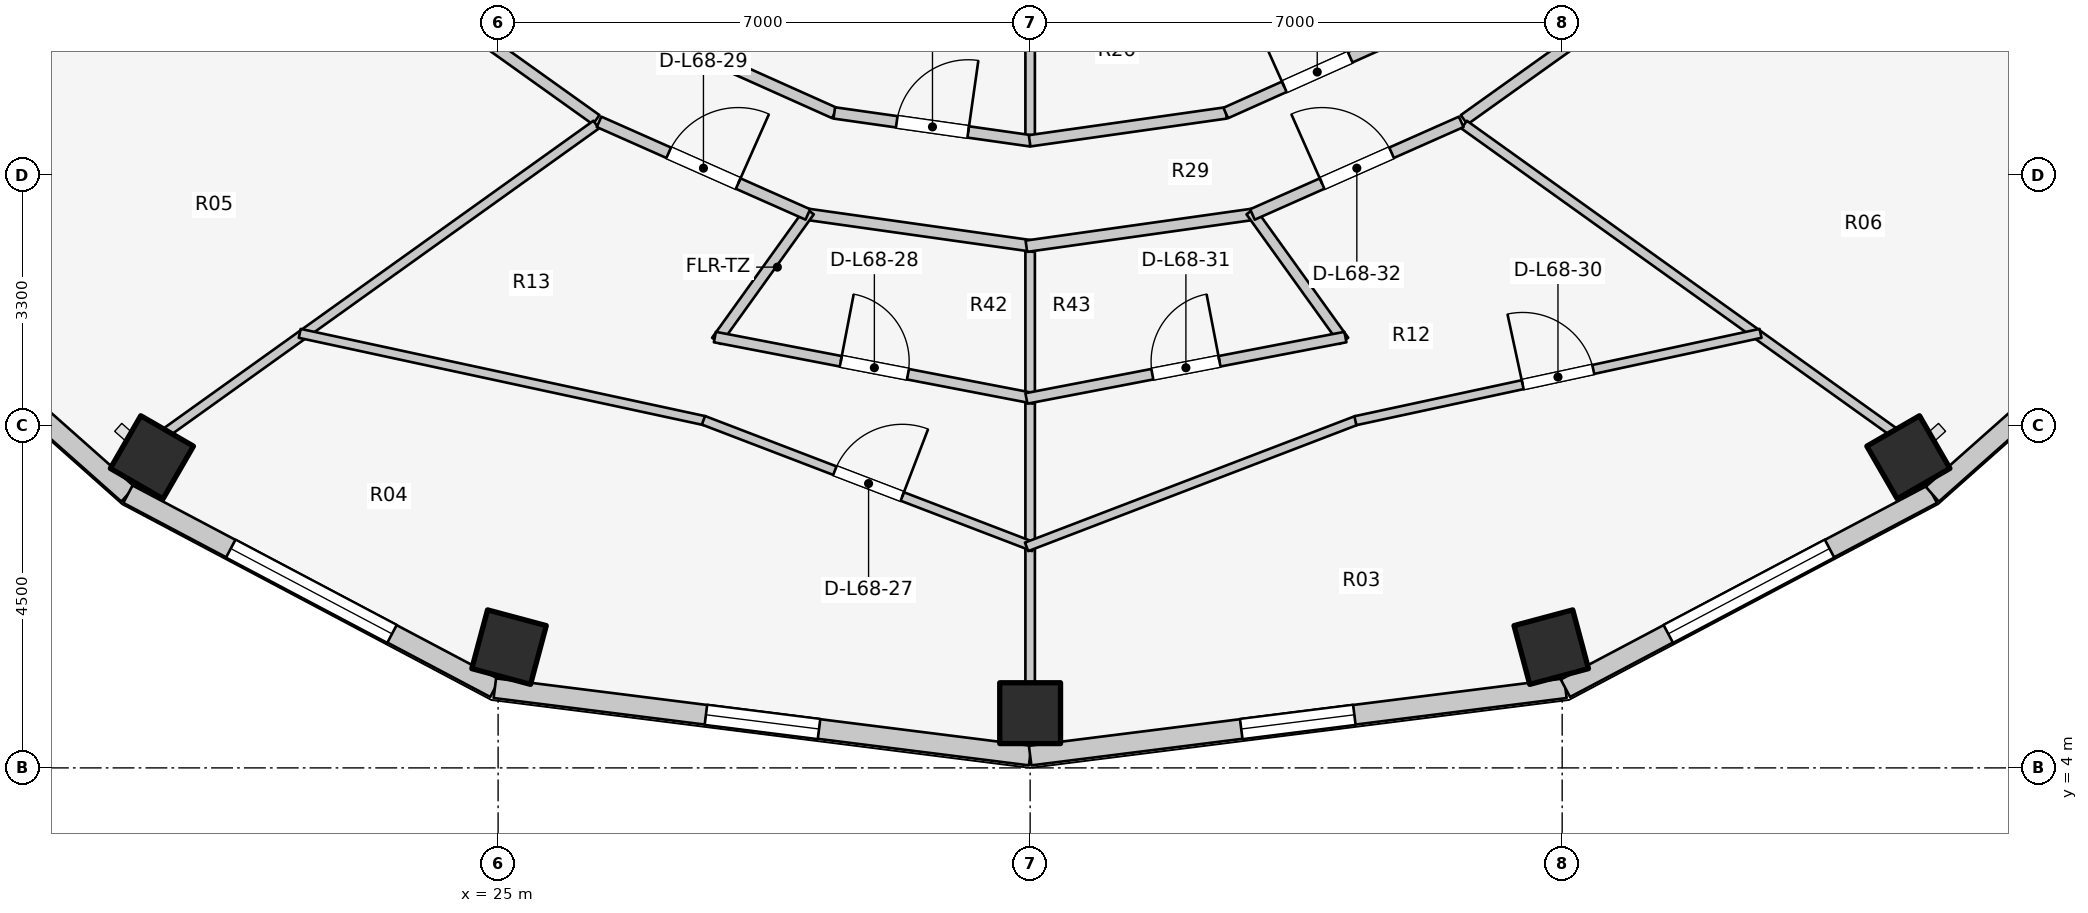
"""IFC4 building model, lengths in metres.
Left out: names, types, materials, properties, quantities, classifications, styles, units other than length and angle.
Written with IfcOpenShell. Run it as: python <this file> out.ifc"""

import sys

from ifc_helpers import new_model, si_unit, direction, frame, frame_2d, origin, origin_2d, place, context, subcontext, project, spatial, rectangle, extrude, element, fill, save


model = new_model("IFC4")
c1 = context("Model", 3, precision=1e-05, world=origin(), true_north=direction((0.0, 1.0)))
c2 = subcontext(c1, "Body", "Model", "MODEL_VIEW")
j1 = project(units=[si_unit("LENGTHUNIT", "METRE"), si_unit("PLANEANGLEUNIT", "RADIAN")], contexts=[c1])
p1 = place(None, origin())
s1 = spatial("IfcSite", under=j1, at=p1, CompositionType="ELEMENT")
p2 = place(p1, origin())
s2 = spatial("IfcBuilding", under=s1, at=p2, CompositionType="ELEMENT")
p3 = place(p2, frame((0.0, 0.0, 223.3)))
s3 = spatial("IfcBuildingStorey", under=s2, at=p3, CompositionType="ELEMENT", Elevation=223.3)
for number, where, z_axis, x_axis in (
    (1, (20.445, 8.086, 0.0), (0.0, 0.0, 1.0), (-0.5, -0.866, 0.0)),
    (2, (25.144, 5.589, 0.0), (0.0, 0.0, 1.0), (-0.259, -0.966, 0.0)),
    (3, (32.0, 4.72, 0.0), (0.0, 0.0, 1.0), (0.0, -1.0, 0.0)),
    (4, (38.856, 5.589, 0.0), (0.0, 0.0, 1.0), (0.259, -0.966, 0.0)),
    (5, (43.555, 8.086, 0.0), (0.0, 0.0, 1.0), (0.5, -0.866, 0.0)),
):
    element("IfcColumn", number, at=place(p3, frame(where, z_axis=z_axis, x_axis=x_axis)), inside=s3, PredefinedType="COLUMN", context=c2, shape_type="SweptSolid", body=[
        extrude(rectangle(XDim=0.8, YDim=0.8, at=origin_2d()), origin(), (0.0, 0.0, 1.0), 3.1),
    ])
p4 = place(p3, frame((16.442, 10.871, 0.0), z_axis=(0.0, 0.0, 1.0), x_axis=(0.748165854006, -0.663511759428, 0.0)))
e6 = element("IfcWall", 6, at=p4, inside=s3, PredefinedType="STANDARD", context=c2, shape_type="SweptSolid", body=[
    extrude(rectangle(XDim=4.929, YDim=0.26, at=frame_2d((2.464, 0.0))), origin(), (0.0, 0.0, 1.0), 2.85),
])
p5 = place(p3, frame((20.13, 7.601, 0.0), z_axis=(0.0, 0.0, 1.0), x_axis=(0.884000981341, -0.46748504253, 0.0)))
e7 = element("IfcWall", 7, at=p5, inside=s3, PredefinedType="STANDARD", context=c2, shape_type="SweptSolid", body=[
    extrude(rectangle(XDim=5.46, YDim=0.26, at=frame_2d((2.73, 0.0))), origin(), (0.0, 0.0, 1.0), 2.85),
])
p6 = place(p5, frame((1.53, 0.0, 0.75)))
e8 = element("IfcOpeningElement", 8, at=p6, cuts=e7, PredefinedType="OPENING", context=c2, shape_type="SweptSolid", body=[
    extrude(rectangle(XDim=2.4, YDim=1.7, at=frame_2d((1.2, 0.85))), frame((0.0, 0.14, 0.0), z_axis=(0.0, -1.0, 0.0), x_axis=(1.0, 0.0, 0.0)), (0.0, 0.0, 1.0), 0.28),
])
p7 = place(p3, frame((24.957, 5.048, 0.0), z_axis=(0.0, 0.0, 1.0), x_axis=(0.992180211307, -0.124813574142, 0.0)))
e9 = element("IfcWall", 9, at=p7, inside=s3, PredefinedType="STANDARD", context=c2, shape_type="SweptSolid", body=[
    extrude(rectangle(XDim=7.098, YDim=0.26, at=frame_2d((3.549, 0.0))), origin(), (0.0, 0.0, 1.0), 2.85),
])
p8 = place(p7, frame((2.799, 0.0, 0.75)))
e10 = element("IfcOpeningElement", 10, at=p8, cuts=e9, PredefinedType="OPENING", context=c2, shape_type="SweptSolid", body=[
    extrude(rectangle(XDim=1.5, YDim=1.6, at=frame_2d((0.75, 0.8))), frame((0.0, 0.14, 0.0), z_axis=(0.0, -1.0, 0.0), x_axis=(1.0, 0.0, 0.0)), (0.0, 0.0, 1.0), 0.28),
])
p9 = place(p3, frame((32.0, 4.162, 0.0), z_axis=(0.0, 0.0, 1.0), x_axis=(0.992180211307, 0.124813574142, 0.0)))
e11 = element("IfcWall", 11, at=p9, inside=s3, PredefinedType="STANDARD", context=c2, shape_type="SweptSolid", body=[
    extrude(rectangle(XDim=7.098, YDim=0.26, at=frame_2d((3.549, 0.0))), origin(), (0.0, 0.0, 1.0), 2.85),
])
p10 = place(p9, frame((2.799, 0.0, 0.75)))
e12 = element("IfcOpeningElement", 12, at=p10, cuts=e11, PredefinedType="OPENING", context=c2, shape_type="SweptSolid", body=[
    extrude(rectangle(XDim=1.5, YDim=1.6, at=frame_2d((0.75, 0.8))), frame((0.0, 0.14, 0.0), z_axis=(0.0, -1.0, 0.0), x_axis=(1.0, 0.0, 0.0)), (0.0, 0.0, 1.0), 0.28),
])
p11 = place(p3, frame((39.043, 5.048, 0.0), z_axis=(0.0, 0.0, 1.0), x_axis=(0.884000981341, 0.46748504253, 0.0)))
e13 = element("IfcWall", 13, at=p11, inside=s3, PredefinedType="STANDARD", context=c2, shape_type="SweptSolid", body=[
    extrude(rectangle(XDim=5.46, YDim=0.26, at=frame_2d((2.73, 0.0))), origin(), (0.0, 0.0, 1.0), 2.85),
])
p12 = place(p11, frame((1.53, 0.0, 0.75)))
e14 = element("IfcOpeningElement", 14, at=p12, cuts=e13, PredefinedType="OPENING", context=c2, shape_type="SweptSolid", body=[
    extrude(rectangle(XDim=2.4, YDim=1.7, at=frame_2d((1.2, 0.85))), frame((0.0, 0.14, 0.0), z_axis=(0.0, -1.0, 0.0), x_axis=(1.0, 0.0, 0.0)), (0.0, 0.0, 1.0), 0.28),
])
p13 = place(p3, frame((43.87, 7.601, 0.0), z_axis=(0.0, 0.0, 1.0), x_axis=(0.748165854006, 0.663511759428, 0.0)))
e15 = element("IfcWall", 15, at=p13, inside=s3, PredefinedType="STANDARD", context=c2, shape_type="SweptSolid", body=[
    extrude(rectangle(XDim=4.929, YDim=0.26, at=frame_2d((2.464, 0.0))), origin(), (0.0, 0.0, 1.0), 2.85),
])
p14 = place(p3, frame((32.0, 14.9, 0.0), z_axis=(0.0, 0.0, 1.0), x_axis=(0.0, -1.0, 0.0)))
e16 = element("IfcWall", 16, at=p14, inside=s3, PredefinedType="PARTITIONING", context=c2, shape_type="SweptSolid", body=[
    extrude(rectangle(XDim=2.65, YDim=0.125, at=frame_2d((1.325, 0.0))), origin(), (0.0, 0.0, 1.0), 2.376),
])
p15 = place(p3, frame((27.019, 13.694, 0.0), z_axis=(0.0, 0.0, 1.0), x_axis=(0.912628408652, -0.408790151203, 0.0)))
e17 = element("IfcWall", 17, at=p15, inside=s3, PredefinedType="PARTITIONING", context=c2, shape_type="SweptSolid", body=[
    extrude(rectangle(XDim=2.638, YDim=0.15, at=frame_2d((1.319, 0.0))), origin(), (0.0, 0.0, 1.0), 2.376),
])
p16 = place(p3, frame((29.423, 12.617, 0.0), z_axis=(0.0, 0.0, 1.0), x_axis=(0.990078185178, -0.140517569133, 0.0)))
e18 = element("IfcWall", 18, at=p16, inside=s3, PredefinedType="PARTITIONING", context=c2, shape_type="SweptSolid", body=[
    extrude(rectangle(XDim=2.61, YDim=0.15, at=frame_2d((1.305, 0.0))), origin(), (0.0, 0.0, 1.0), 2.376),
])
p17 = place(p16, frame((0.83, 0.0, 0.0)))
e19 = element("IfcOpeningElement", 19, at=p17, cuts=e18, PredefinedType="OPENING", context=c2, shape_type="SweptSolid", body=[
    extrude(rectangle(XDim=0.95, YDim=2.1, at=frame_2d((0.475, 1.05))), frame((0.0, 0.085, 0.0), z_axis=(0.0, -1.0, 0.0), x_axis=(1.0, 0.0, 0.0)), (0.0, 0.0, 1.0), 0.17),
])
p18 = place(p3, frame((31.993, 12.25, 0.0), z_axis=(0.0, 0.0, 1.0), x_axis=(0.990078185178, 0.140517569133, 0.0)))
e20 = element("IfcWall", 20, at=p18, inside=s3, PredefinedType="PARTITIONING", context=c2, shape_type="SweptSolid", body=[
    extrude(rectangle(XDim=2.61, YDim=0.15, at=frame_2d((1.305, 0.0))), origin(), (0.0, 0.0, 1.0), 2.376),
])
p19 = place(p3, frame((34.573, 12.616, 0.0), z_axis=(0.0, 0.0, 1.0), x_axis=(0.912628408652, 0.408790151203, 0.0)))
e21 = element("IfcWall", 21, at=p19, inside=s3, PredefinedType="PARTITIONING", context=c2, shape_type="SweptSolid", body=[
    extrude(rectangle(XDim=2.638, YDim=0.15, at=frame_2d((1.319, 0.0))), origin(), (0.0, 0.0, 1.0), 2.376),
])
p20 = place(p19, frame((0.844, 0.0, 0.0)))
e22 = element("IfcOpeningElement", 22, at=p20, cuts=e21, PredefinedType="OPENING", context=c2, shape_type="SweptSolid", body=[
    extrude(rectangle(XDim=0.95, YDim=2.1, at=frame_2d((0.475, 1.05))), frame((0.0, 0.085, 0.0), z_axis=(0.0, -1.0, 0.0), x_axis=(1.0, 0.0, 0.0)), (0.0, 0.0, 1.0), 0.17),
])
for number, where, z_axis, x_axis in (
    (23, (26.29, 12.527, 0.0), (0.0, 0.0, 1.0), (-0.814, 0.581, 0.0)),
    (24, (37.71, 12.527, 0.0), (0.0, 0.0, 1.0), (0.814, 0.581, 0.0)),
):
    element("IfcWall", number, at=place(p3, frame(where, z_axis=z_axis, x_axis=x_axis)), inside=s3, PredefinedType="PARTITIONING", context=c2, shape_type="SweptSolid", body=[
        extrude(rectangle(XDim=2.082, YDim=0.15, at=frame_2d((1.041, 0.0))), origin(), (0.0, 0.0, 1.0), 2.376),
    ])
p21 = place(p3, frame((26.29, 12.463, 0.0), z_axis=(0.0, 0.0, 1.0), x_axis=(-0.813163816543, -0.582034885093, 0.0)))
e25 = element("IfcWall", 25, at=p21, inside=s3, PredefinedType="PARTITIONING", context=c2, shape_type="SweptSolid", body=[
    extrude(rectangle(XDim=6.955, YDim=0.125, at=frame_2d((3.477, 0.0))), origin(), (0.0, 0.0, 1.0), 2.376),
])
p22 = place(p3, frame((32.0, 10.815, 0.0), z_axis=(0.0, 0.0, 1.0), x_axis=(0.0, -1.0, 0.0)))
e26 = element("IfcWall", 26, at=p22, inside=s3, PredefinedType="PARTITIONING", context=c2, shape_type="SweptSolid", body=[
    extrude(rectangle(XDim=5.715, YDim=0.125, at=frame_2d((2.857, 0.0))), origin(), (0.0, 0.0, 1.0), 2.376),
])
p23 = place(p3, frame((37.71, 12.463, 0.0), z_axis=(0.0, 0.0, 1.0), x_axis=(0.813163816543, -0.582034885093, 0.0)))
e27 = element("IfcWall", 27, at=p23, inside=s3, PredefinedType="PARTITIONING", context=c2, shape_type="SweptSolid", body=[
    extrude(rectangle(XDim=6.955, YDim=0.125, at=frame_2d((3.477, 0.0))), origin(), (0.0, 0.0, 1.0), 2.376),
])
p24 = place(p3, frame((22.39, 9.717, 0.0), z_axis=(0.0, 0.0, 1.0), x_axis=(0.977534972695, -0.210773283785, 0.0)))
e28 = element("IfcWall", 28, at=p24, inside=s3, PredefinedType="MOVABLE", context=c2, shape_type="SweptSolid", body=[
    extrude(rectangle(XDim=5.453, YDim=0.12, at=frame_2d((2.727, 0.0))), origin(), (0.0, 0.0, 1.0), 2.376),
])
p25 = place(p3, frame((27.702, 8.573, 0.0), z_axis=(0.0, 0.0, 1.0), x_axis=(0.933766866443, -0.357881878744, 0.0)))
e29 = element("IfcWall", 29, at=p25, inside=s3, PredefinedType="MOVABLE", context=c2, shape_type="SweptSolid", body=[
    extrude(rectangle(XDim=4.653, YDim=0.12, at=frame_2d((2.327, 0.0))), origin(), (0.0, 0.0, 1.0), 2.376),
])
p26 = place(p25, frame((1.852, 0.0, 0.0)))
e30 = element("IfcOpeningElement", 30, at=p26, cuts=e29, PredefinedType="OPENING", context=c2, shape_type="SweptSolid", body=[
    extrude(rectangle(XDim=0.95, YDim=2.1, at=frame_2d((0.475, 1.05))), frame((0.0, 0.07, 0.0), z_axis=(0.0, -1.0, 0.0), x_axis=(1.0, 0.0, 0.0)), (0.0, 0.0, 1.0), 0.14),
])
p27 = place(p3, frame((29.018, 11.29, 0.0), z_axis=(0.0, 0.0, 1.0), x_axis=(0.990214091671, -0.13955662885, 0.0)))
e31 = element("IfcWall", 31, at=p27, inside=s3, PredefinedType="PARTITIONING", context=c2, shape_type="SweptSolid", body=[
    extrude(rectangle(XDim=3.062, YDim=0.15, at=frame_2d((1.531, 0.0))), origin(), (0.0, 0.0, 1.0), 2.376),
])
p28 = place(p3, frame((29.097, 11.324, 0.0), z_axis=(0.0, 0.0, 1.0), x_axis=(-0.583259891741, -0.812285601673, 0.0)))
e32 = element("IfcWall", 32, at=p28, inside=s3, PredefinedType="PLUMBINGWALL", context=c2, shape_type="SweptSolid", body=[
    extrude(rectangle(XDim=2.1, YDim=0.14, at=frame_2d((1.05, 0.0))), origin(), (0.0, 0.0, 1.0), 2.385),
])
p29 = place(p3, frame((27.852, 9.668, 0.0), z_axis=(0.0, 0.0, 1.0), x_axis=(0.98198484664, -0.188959680803, 0.0)))
e33 = element("IfcWall", 33, at=p29, inside=s3, PredefinedType="PLUMBINGWALL", context=c2, shape_type="SweptSolid", body=[
    extrude(rectangle(XDim=4.274, YDim=0.14, at=frame_2d((2.137, 0.0))), origin(), (0.0, 0.0, 1.0), 2.376),
])
p30 = place(p29, frame((1.687, 0.0, 0.0)))
e34 = element("IfcOpeningElement", 34, at=p30, cuts=e33, PredefinedType="OPENING", context=c2, shape_type="SweptSolid", body=[
    extrude(rectangle(XDim=0.9, YDim=2.1, at=frame_2d((0.45, 1.05))), frame((0.0, 0.08, 0.0), z_axis=(0.0, -1.0, 0.0), x_axis=(1.0, 0.0, 0.0)), (0.0, 0.0, 1.0), 0.16),
])
p31 = place(p3, frame((26.328, 12.499, 0.0), z_axis=(0.0, 0.0, 1.0), x_axis=(0.914139569865, -0.405399613724, 0.0)))
e35 = element("IfcWall", 35, at=p31, inside=s3, PredefinedType="PARTITIONING", context=c2, shape_type="SweptSolid", body=[
    extrude(rectangle(XDim=3.005, YDim=0.15, at=frame_2d((1.502, 0.0))), origin(), (0.0, 0.0, 1.0), 2.376),
])
p32 = place(p31, frame((1.002, 0.0, 0.0)))
e36 = element("IfcOpeningElement", 36, at=p32, cuts=e35, PredefinedType="OPENING", context=c2, shape_type="SweptSolid", body=[
    extrude(rectangle(XDim=1.0, YDim=2.1, at=frame_2d((0.5, 1.05))), frame((0.0, 0.085, 0.0), z_axis=(0.0, -1.0, 0.0), x_axis=(1.0, 0.0, 0.0)), (0.0, 0.0, 1.0), 0.17),
])
p33 = place(p3, frame((31.953, 6.908, 0.0), z_axis=(0.0, 0.0, 1.0), x_axis=(0.933766866443, 0.357881878744, 0.0)))
e37 = element("IfcWall", 37, at=p33, inside=s3, PredefinedType="MOVABLE", context=c2, shape_type="SweptSolid", body=[
    extrude(rectangle(XDim=4.653, YDim=0.12, at=frame_2d((2.327, 0.0))), origin(), (0.0, 0.0, 1.0), 2.376),
])
p34 = place(p3, frame((36.279, 8.567, 0.0), z_axis=(0.0, 0.0, 1.0), x_axis=(0.977534972695, 0.210773283785, 0.0)))
e38 = element("IfcWall", 38, at=p34, inside=s3, PredefinedType="MOVABLE", context=c2, shape_type="SweptSolid", body=[
    extrude(rectangle(XDim=5.453, YDim=0.12, at=frame_2d((2.727, 0.0))), origin(), (0.0, 0.0, 1.0), 2.376),
])
p35 = place(p34, frame((2.252, 0.0, 0.0)))
e39 = element("IfcOpeningElement", 39, at=p35, cuts=e38, PredefinedType="OPENING", context=c2, shape_type="SweptSolid", body=[
    extrude(rectangle(XDim=0.95, YDim=2.1, at=frame_2d((0.475, 1.05))), frame((0.0, 0.07, 0.0), z_axis=(0.0, -1.0, 0.0), x_axis=(1.0, 0.0, 0.0)), (0.0, 0.0, 1.0), 0.14),
])
p36 = place(p3, frame((31.95, 10.863, 0.0), z_axis=(0.0, 0.0, 1.0), x_axis=(0.990214091671, 0.13955662885, 0.0)))
e40 = element("IfcWall", 40, at=p36, inside=s3, PredefinedType="PARTITIONING", context=c2, shape_type="SweptSolid", body=[
    extrude(rectangle(XDim=3.062, YDim=0.15, at=frame_2d((1.531, 0.0))), origin(), (0.0, 0.0, 1.0), 2.376),
])
p37 = place(p3, frame((34.903, 11.324, 0.0), z_axis=(0.0, 0.0, 1.0), x_axis=(0.583259891741, -0.812285601673, 0.0)))
e41 = element("IfcWall", 41, at=p37, inside=s3, PredefinedType="PLUMBINGWALL", context=c2, shape_type="SweptSolid", body=[
    extrude(rectangle(XDim=2.1, YDim=0.14, at=frame_2d((1.05, 0.0))), origin(), (0.0, 0.0, 1.0), 2.385),
])
p38 = place(p3, frame((31.951, 8.861, 0.0), z_axis=(0.0, 0.0, 1.0), x_axis=(0.98198484664, 0.188959680803, 0.0)))
e42 = element("IfcWall", 42, at=p38, inside=s3, PredefinedType="PLUMBINGWALL", context=c2, shape_type="SweptSolid", body=[
    extrude(rectangle(XDim=4.274, YDim=0.14, at=frame_2d((2.137, 0.0))), origin(), (0.0, 0.0, 1.0), 2.376),
])
p39 = place(p38, frame((1.687, 0.0, 0.0)))
e43 = element("IfcOpeningElement", 43, at=p39, cuts=e42, PredefinedType="OPENING", context=c2, shape_type="SweptSolid", body=[
    extrude(rectangle(XDim=0.9, YDim=2.1, at=frame_2d((0.45, 1.05))), frame((0.0, 0.08, 0.0), z_axis=(0.0, -1.0, 0.0), x_axis=(1.0, 0.0, 0.0)), (0.0, 0.0, 1.0), 0.16),
])
p40 = place(p3, frame((34.925, 11.281, 0.0), z_axis=(0.0, 0.0, 1.0), x_axis=(0.914139569865, 0.405399613724, 0.0)))
e44 = element("IfcWall", 44, at=p40, inside=s3, PredefinedType="PARTITIONING", context=c2, shape_type="SweptSolid", body=[
    extrude(rectangle(XDim=3.005, YDim=0.15, at=frame_2d((1.502, 0.0))), origin(), (0.0, 0.0, 1.0), 2.376),
])
p41 = place(p40, frame((1.002, 0.0, 0.0)))
e45 = element("IfcOpeningElement", 45, at=p41, cuts=e44, PredefinedType="OPENING", context=c2, shape_type="SweptSolid", body=[
    extrude(rectangle(XDim=1.0, YDim=2.1, at=frame_2d((0.5, 1.05))), frame((0.0, 0.085, 0.0), z_axis=(0.0, -1.0, 0.0), x_axis=(1.0, 0.0, 0.0)), (0.0, 0.0, 1.0), 0.17),
])
p42 = place(p6, origin())
e46 = element("IfcWindow", 46, at=p42, inside=s3, PartitioningType="SINGLE_PANEL", PredefinedType="WINDOW", context=c2, shape_type="SweptSolid", body=[
    extrude(rectangle(XDim=2.4, YDim=1.7, at=frame_2d((1.2, 0.85))), frame((0.0, 0.03, 0.0), z_axis=(0.0, -1.0, 0.0), x_axis=(1.0, 0.0, 0.0)), (0.0, 0.0, 1.0), 0.06),
])
fill(e8, e46)
p43 = place(p8, origin())
e47 = element("IfcWindow", 47, at=p43, inside=s3, PartitioningType="SINGLE_PANEL", PredefinedType="WINDOW", context=c2, shape_type="SweptSolid", body=[
    extrude(rectangle(XDim=1.5, YDim=1.6, at=frame_2d((0.75, 0.8))), frame((0.0, 0.03, 0.0), z_axis=(0.0, -1.0, 0.0), x_axis=(1.0, 0.0, 0.0)), (0.0, 0.0, 1.0), 0.06),
])
fill(e10, e47)
p44 = place(p10, origin())
e48 = element("IfcWindow", 48, at=p44, inside=s3, PartitioningType="SINGLE_PANEL", PredefinedType="WINDOW", context=c2, shape_type="SweptSolid", body=[
    extrude(rectangle(XDim=1.5, YDim=1.6, at=frame_2d((0.75, 0.8))), frame((0.0, 0.03, 0.0), z_axis=(0.0, -1.0, 0.0), x_axis=(1.0, 0.0, 0.0)), (0.0, 0.0, 1.0), 0.06),
])
fill(e12, e48)
p45 = place(p12, origin())
e49 = element("IfcWindow", 49, at=p45, inside=s3, PartitioningType="SINGLE_PANEL", PredefinedType="WINDOW", context=c2, shape_type="SweptSolid", body=[
    extrude(rectangle(XDim=2.4, YDim=1.7, at=frame_2d((1.2, 0.85))), frame((0.0, 0.03, 0.0), z_axis=(0.0, -1.0, 0.0), x_axis=(1.0, 0.0, 0.0)), (0.0, 0.0, 1.0), 0.06),
])
fill(e14, e49)
p46 = place(p17, origin())
e50 = element("IfcDoor", 50, at=p46, inside=s3, OperationType="SINGLE_SWING_RIGHT", PredefinedType="DOOR", context=c2, shape_type="SweptSolid", body=[
    extrude(rectangle(XDim=0.95, YDim=2.1, at=frame_2d((0.475, 1.05))), frame((0.0, 0.025, 0.0), z_axis=(0.0, -1.0, 0.0), x_axis=(1.0, 0.0, 0.0)), (0.0, 0.0, 1.0), 0.05),
])
fill(e19, e50)
p47 = place(p20, origin())
e51 = element("IfcDoor", 51, at=p47, inside=s3, OperationType="SINGLE_SWING_LEFT", PredefinedType="DOOR", context=c2, shape_type="SweptSolid", body=[
    extrude(rectangle(XDim=0.95, YDim=2.1, at=frame_2d((0.475, 1.05))), frame((0.0, 0.025, 0.0), z_axis=(0.0, -1.0, 0.0), x_axis=(1.0, 0.0, 0.0)), (0.0, 0.0, 1.0), 0.05),
])
fill(e22, e51)
p48 = place(p26, origin())
e52 = element("IfcDoor", 52, at=p48, inside=s3, OperationType="SINGLE_SWING_RIGHT", PredefinedType="DOOR", context=c2, shape_type="SweptSolid", body=[
    extrude(rectangle(XDim=0.95, YDim=2.1, at=frame_2d((0.475, 1.05))), frame((0.0, 0.025, 0.0), z_axis=(0.0, -1.0, 0.0), x_axis=(1.0, 0.0, 0.0)), (0.0, 0.0, 1.0), 0.05),
])
fill(e30, e52)
p49 = place(p30, origin())
e53 = element("IfcDoor", 53, at=p49, inside=s3, OperationType="SINGLE_SWING_LEFT", PredefinedType="DOOR", context=c2, shape_type="SweptSolid", body=[
    extrude(rectangle(XDim=0.9, YDim=2.1, at=frame_2d((0.45, 1.05))), frame((0.0, 0.025, 0.0), z_axis=(0.0, -1.0, 0.0), x_axis=(1.0, 0.0, 0.0)), (0.0, 0.0, 1.0), 0.05),
])
fill(e34, e53)
p50 = place(p32, origin())
e54 = element("IfcDoor", 54, at=p50, inside=s3, OperationType="SINGLE_SWING_RIGHT", PredefinedType="DOOR", context=c2, shape_type="SweptSolid", body=[
    extrude(rectangle(XDim=1.0, YDim=2.1, at=frame_2d((0.5, 1.05))), frame((0.0, 0.025, 0.0), z_axis=(0.0, -1.0, 0.0), x_axis=(1.0, 0.0, 0.0)), (0.0, 0.0, 1.0), 0.05),
])
fill(e36, e54)
p51 = place(p35, origin())
e55 = element("IfcDoor", 55, at=p51, inside=s3, OperationType="SINGLE_SWING_LEFT", PredefinedType="DOOR", context=c2, shape_type="SweptSolid", body=[
    extrude(rectangle(XDim=0.95, YDim=2.1, at=frame_2d((0.475, 1.05))), frame((0.0, 0.025, 0.0), z_axis=(0.0, -1.0, 0.0), x_axis=(1.0, 0.0, 0.0)), (0.0, 0.0, 1.0), 0.05),
])
fill(e39, e55)
p52 = place(p39, origin())
e56 = element("IfcDoor", 56, at=p52, inside=s3, OperationType="SINGLE_SWING_RIGHT", PredefinedType="DOOR", context=c2, shape_type="SweptSolid", body=[
    extrude(rectangle(XDim=0.9, YDim=2.1, at=frame_2d((0.45, 1.05))), frame((0.0, 0.025, 0.0), z_axis=(0.0, -1.0, 0.0), x_axis=(1.0, 0.0, 0.0)), (0.0, 0.0, 1.0), 0.05),
])
fill(e43, e56)
p53 = place(p41, origin())
e57 = element("IfcDoor", 57, at=p53, inside=s3, OperationType="SINGLE_SWING_LEFT", PredefinedType="DOOR", context=c2, shape_type="SweptSolid", body=[
    extrude(rectangle(XDim=1.0, YDim=2.1, at=frame_2d((0.5, 1.05))), frame((0.0, 0.025, 0.0), z_axis=(0.0, -1.0, 0.0), x_axis=(1.0, 0.0, 0.0)), (0.0, 0.0, 1.0), 0.05),
])
fill(e45, e57)
save(model, sys.argv[1])
